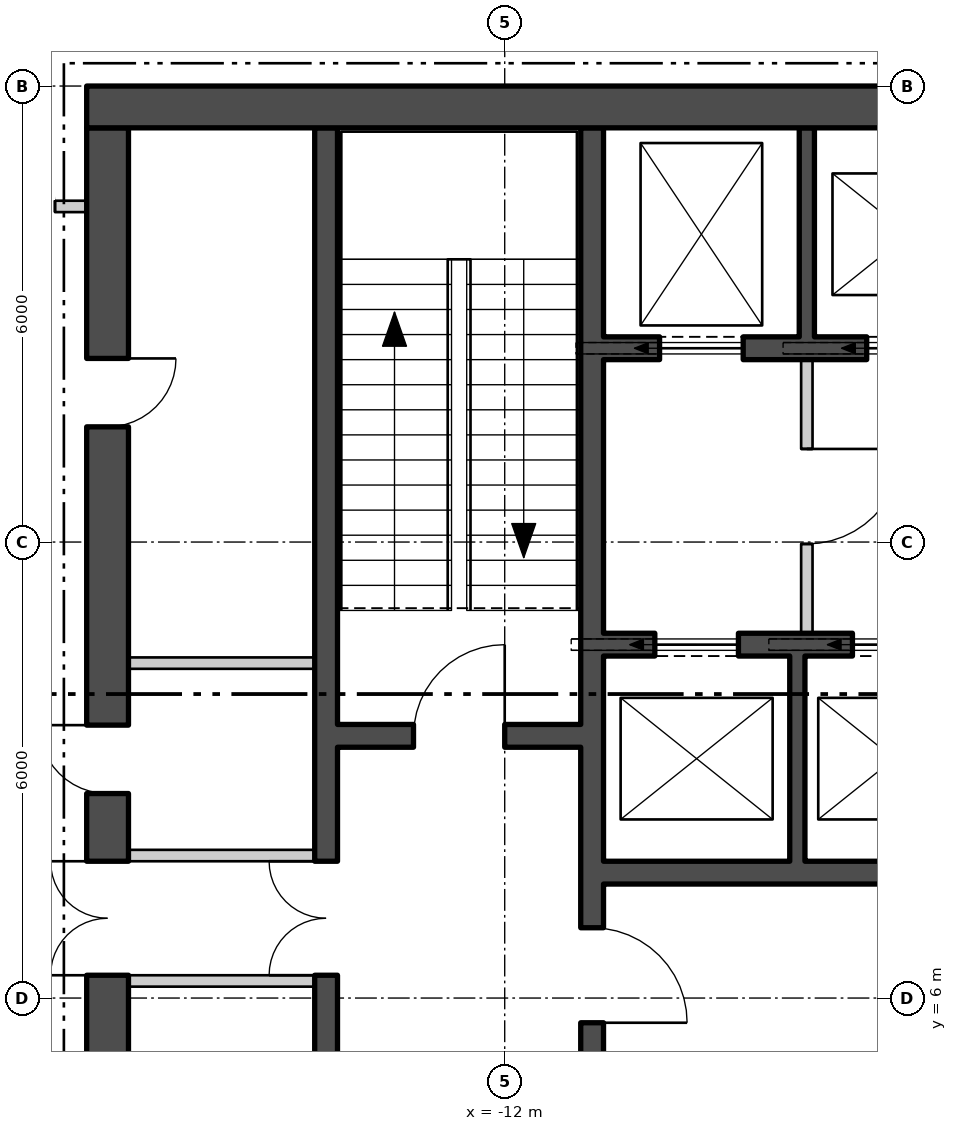
"""IFC4 building model, lengths in metres.
Left out: names, types, materials, properties, quantities, classifications, styles, units other than length and angle.
Written with IfcOpenShell. Run it as: python <this file> out.ifc"""

import sys

from ifc_helpers import new_model, si_unit, direction, frame, frame_2d, origin, place, context, subcontext, project, spatial, polyline, rectangle, outline, extrude, element, fill, save


model = new_model("IFC4")
c1 = context("Model", 3, precision=1e-05, world=origin(), true_north=direction((0.0, 1.0)))
c2 = subcontext(c1, "Body", "Model", "MODEL_VIEW")
j1 = project(units=[si_unit("LENGTHUNIT", "METRE"), si_unit("PLANEANGLEUNIT", "RADIAN")], contexts=[c1])
p1 = place(None, origin())
s1 = spatial("IfcSite", under=j1, at=p1, CompositionType="ELEMENT")
p2 = place(p1, origin())
s2 = spatial("IfcBuilding", under=s1, at=p2, CompositionType="ELEMENT")
p3 = place(p2, frame((0.0, 0.0, 84.3)))
s3 = spatial("IfcBuildingStorey", under=s2, at=p3, CompositionType="ELEMENT", Elevation=84.3)
p4 = place(p3, frame((-27.95, 11.167, -0.18), z_axis=(0.0, 0.0, 1.0), x_axis=(0.499999194392, -0.866025868902, 0.0)))
e1 = element("IfcWall", 1, at=p4, inside=s3, PredefinedType="SOLIDWALL", context=c2, shape_type="SweptSolid", body=[
    extrude(outline(polyline([(-0.13, -0.225), (45.86, -0.225), (45.6, 0.225), (0.13, 0.225), (-0.13, -0.225)])), origin(), (0.0, 0.0, 1.0), 4.28),
])
p5 = place(p4, frame((5.892, 0.0, 1.08)))
e2 = element("IfcOpeningElement", 2, at=p5, cuts=e1, PredefinedType="OPENING", context=c2, shape_type="SweptSolid", body=[
    extrude(rectangle(XDim=2.4, YDim=2.6, at=frame_2d((1.2, 1.3))), frame((0.0, 0.235, 0.0), z_axis=(0.0, -1.0, 0.0), x_axis=(1.0, 0.0, 0.0)), (0.0, 0.0, 1.0), 0.47),
])
p6 = place(p4, frame((10.399, 0.0, 1.08)))
e3 = element("IfcOpeningElement", 3, at=p6, cuts=e1, PredefinedType="OPENING", context=c2, shape_type="SweptSolid", body=[
    extrude(rectangle(XDim=2.4, YDim=2.6, at=frame_2d((1.2, 1.3))), frame((0.0, 0.235, 0.0), z_axis=(0.0, -1.0, 0.0), x_axis=(1.0, 0.0, 0.0)), (0.0, 0.0, 1.0), 0.47),
])
p7 = place(p4, frame((14.905, 0.0, 1.08)))
e4 = element("IfcOpeningElement", 4, at=p7, cuts=e1, PredefinedType="OPENING", context=c2, shape_type="SweptSolid", body=[
    extrude(rectangle(XDim=2.4, YDim=2.6, at=frame_2d((1.2, 1.3))), frame((0.0, 0.235, 0.0), z_axis=(0.0, -1.0, 0.0), x_axis=(1.0, 0.0, 0.0)), (0.0, 0.0, 1.0), 0.47),
])
p8 = place(p4, frame((19.412, 0.0, 1.08)))
e5 = element("IfcOpeningElement", 5, at=p8, cuts=e1, PredefinedType="OPENING", context=c2, shape_type="SweptSolid", body=[
    extrude(rectangle(XDim=2.4, YDim=2.6, at=frame_2d((1.2, 1.3))), frame((0.0, 0.235, 0.0), z_axis=(0.0, -1.0, 0.0), x_axis=(1.0, 0.0, 0.0)), (0.0, 0.0, 1.0), 0.47),
])
p9 = place(p4, frame((23.918, 0.0, 1.08)))
e6 = element("IfcOpeningElement", 6, at=p9, cuts=e1, PredefinedType="OPENING", context=c2, shape_type="SweptSolid", body=[
    extrude(rectangle(XDim=2.4, YDim=2.6, at=frame_2d((1.2, 1.3))), frame((0.0, 0.235, 0.0), z_axis=(0.0, -1.0, 0.0), x_axis=(1.0, 0.0, 0.0)), (0.0, 0.0, 1.0), 0.47),
])
p10 = place(p4, frame((28.425, 0.0, 1.08)))
e7 = element("IfcOpeningElement", 7, at=p10, cuts=e1, PredefinedType="OPENING", context=c2, shape_type="SweptSolid", body=[
    extrude(rectangle(XDim=2.4, YDim=2.6, at=frame_2d((1.2, 1.3))), frame((0.0, 0.235, 0.0), z_axis=(0.0, -1.0, 0.0), x_axis=(1.0, 0.0, 0.0)), (0.0, 0.0, 1.0), 0.47),
])
p11 = place(p4, frame((32.932, 0.0, 1.08)))
e8 = element("IfcOpeningElement", 8, at=p11, cuts=e1, PredefinedType="OPENING", context=c2, shape_type="SweptSolid", body=[
    extrude(rectangle(XDim=2.4, YDim=2.6, at=frame_2d((1.2, 1.3))), frame((0.0, 0.235, 0.0), z_axis=(0.0, -1.0, 0.0), x_axis=(1.0, 0.0, 0.0)), (0.0, 0.0, 1.0), 0.47),
])
p12 = place(p4, frame((37.438, 0.0, 1.08)))
e9 = element("IfcOpeningElement", 9, at=p12, cuts=e1, PredefinedType="OPENING", context=c2, shape_type="SweptSolid", body=[
    extrude(rectangle(XDim=2.4, YDim=2.6, at=frame_2d((1.2, 1.3))), frame((0.0, 0.235, 0.0), z_axis=(0.0, -1.0, 0.0), x_axis=(1.0, 0.0, 0.0)), (0.0, 0.0, 1.0), 0.47),
])
p13 = place(p4, frame((41.907, 0.0, 1.08)))
e10 = element("IfcOpeningElement", 10, at=p13, cuts=e1, PredefinedType="OPENING", context=c2, shape_type="SweptSolid", body=[
    extrude(rectangle(XDim=2.4, YDim=2.6, at=frame_2d((1.2, 1.3))), frame((0.0, 0.235, 0.0), z_axis=(0.0, -1.0, 0.0), x_axis=(1.0, 0.0, 0.0)), (0.0, 0.0, 1.0), 0.47),
])
p14 = place(p3, frame((-17.5, 17.725, 0.0), z_axis=(0.0, 0.0, 1.0), x_axis=(1.0, 0.0, 0.0)))
e11 = element("IfcWall", 11, at=p14, inside=s3, PredefinedType="SHEAR", context=c2, shape_type="SweptSolid", body=[
    extrude(rectangle(XDim=35.0, YDim=0.55, at=frame_2d((17.5, 0.0))), origin(), (0.0, 0.0, 1.0), 4.3),
])
p15 = place(p3, frame((-17.225, 0.55, 0.0), z_axis=(0.0, 0.0, 1.0), x_axis=(0.0, 1.0, 0.0)))
e12 = element("IfcWall", 12, at=p15, inside=s3, PredefinedType="SHEAR", context=c2, shape_type="SweptSolid", body=[
    extrude(rectangle(XDim=16.9, YDim=0.55, at=frame_2d((8.45, 0.0))), origin(), (0.0, 0.0, 1.0), 4.3),
])
p16 = place(p15, frame((5.75, 0.0, 0.0)))
e13 = element("IfcOpeningElement", 13, at=p16, cuts=e12, PredefinedType="OPENING", context=c2, shape_type="SweptSolid", body=[
    extrude(rectangle(XDim=1.5, YDim=2.1, at=frame_2d((0.75, 1.05))), frame((0.0, 0.285, 0.0), z_axis=(0.0, -1.0, 0.0), x_axis=(1.0, 0.0, 0.0)), (0.0, 0.0, 1.0), 0.57),
])
p17 = place(p15, frame((0.4, 0.0, 0.0)))
e14 = element("IfcOpeningElement", 14, at=p17, cuts=e12, PredefinedType="OPENING", context=c2, shape_type="SweptSolid", body=[
    extrude(rectangle(XDim=1.0, YDim=2.1, at=frame_2d((0.5, 1.05))), frame((0.0, 0.285, 0.0), z_axis=(0.0, -1.0, 0.0), x_axis=(1.0, 0.0, 0.0)), (0.0, 0.0, 1.0), 0.57),
])
p18 = place(p15, frame((3.21, 0.0, 0.0)))
e15 = element("IfcOpeningElement", 15, at=p18, cuts=e12, PredefinedType="OPENING", context=c2, shape_type="SweptSolid", body=[
    extrude(rectangle(XDim=0.9, YDim=2.1, at=frame_2d((0.45, 1.05))), frame((0.0, 0.285, 0.0), z_axis=(0.0, -1.0, 0.0), x_axis=(1.0, 0.0, 0.0)), (0.0, 0.0, 1.0), 0.57),
])
p19 = place(p15, frame((8.141, 0.0, 0.0)))
e16 = element("IfcOpeningElement", 16, at=p19, cuts=e12, PredefinedType="OPENING", context=c2, shape_type="SweptSolid", body=[
    extrude(rectangle(XDim=0.9, YDim=2.1, at=frame_2d((0.45, 1.05))), frame((0.0, 0.285, 0.0), z_axis=(0.0, -1.0, 0.0), x_axis=(1.0, 0.0, 0.0)), (0.0, 0.0, 1.0), 0.57),
])
p20 = place(p15, frame((12.966, 0.0, 0.0)))
e17 = element("IfcOpeningElement", 17, at=p20, cuts=e12, PredefinedType="OPENING", context=c2, shape_type="SweptSolid", body=[
    extrude(rectangle(XDim=0.9, YDim=2.1, at=frame_2d((0.45, 1.05))), frame((0.0, 0.285, 0.0), z_axis=(0.0, -1.0, 0.0), x_axis=(1.0, 0.0, 0.0)), (0.0, 0.0, 1.0), 0.57),
])
p21 = place(p3, frame((-10.85, 0.55, 0.0), z_axis=(0.0, 0.0, 1.0), x_axis=(0.0, 1.0, 0.0)))
e18 = element("IfcWall", 18, at=p21, inside=s3, PredefinedType="SHEAR", context=c2, shape_type="SweptSolid", body=[
    extrude(rectangle(XDim=16.9, YDim=0.3, at=frame_2d((8.45, 0.0))), origin(), (0.0, 0.0, 1.0), 4.3),
])
p22 = place(p21, frame((5.125, 0.0, 0.0)))
e19 = element("IfcOpeningElement", 19, at=p22, cuts=e18, PredefinedType="OPENING", context=c2, shape_type="SweptSolid", body=[
    extrude(rectangle(XDim=1.25, YDim=2.1, at=frame_2d((0.625, 1.05))), frame((0.0, 0.16, 0.0), z_axis=(0.0, -1.0, 0.0), x_axis=(1.0, 0.0, 0.0)), (0.0, 0.0, 1.0), 0.32),
])
p23 = place(p21, frame((1.55, 0.0, 0.0)))
e20 = element("IfcOpeningElement", 20, at=p23, cuts=e18, PredefinedType="OPENING", context=c2, shape_type="SweptSolid", body=[
    extrude(rectangle(XDim=1.0, YDim=2.1, at=frame_2d((0.5, 1.05))), frame((0.0, 0.16, 0.0), z_axis=(0.0, -1.0, 0.0), x_axis=(1.0, 0.0, 0.0)), (0.0, 0.0, 1.0), 0.32),
])
p24 = place(p3, frame((-14.35, 0.55, 0.0), z_axis=(0.0, 0.0, 1.0), x_axis=(0.0, 1.0, 0.0)))
e21 = element("IfcWall", 21, at=p24, inside=s3, PredefinedType="SHEAR", context=c2, shape_type="SweptSolid", body=[
    extrude(rectangle(XDim=16.9, YDim=0.3, at=frame_2d((8.45, 0.0))), origin(), (0.0, 0.0, 1.0), 4.3),
])
p25 = place(p24, frame((5.75, 0.0, 0.0)))
e22 = element("IfcOpeningElement", 22, at=p25, cuts=e21, PredefinedType="OPENING", context=c2, shape_type="SweptSolid", body=[
    extrude(rectangle(XDim=1.5, YDim=2.1, at=frame_2d((0.75, 1.05))), frame((0.0, 0.16, 0.0), z_axis=(0.0, -1.0, 0.0), x_axis=(1.0, 0.0, 0.0)), (0.0, 0.0, 1.0), 0.32),
])
p26 = place(p3, frame((-14.2, 9.45, 0.0), z_axis=(0.0, 0.0, 1.0), x_axis=(1.0, 0.0, 0.0)))
e23 = element("IfcWall", 23, at=p26, inside=s3, PredefinedType="SHEAR", context=c2, shape_type="SweptSolid", body=[
    extrude(rectangle(XDim=3.2, YDim=0.3, at=frame_2d((1.6, 0.0))), origin(), (0.0, 0.0, 1.0), 4.3),
])
p27 = place(p26, frame((1.0, 0.0, 0.0)))
e24 = element("IfcOpeningElement", 24, at=p27, cuts=e23, PredefinedType="OPENING", context=c2, shape_type="SweptSolid", body=[
    extrude(rectangle(XDim=1.2, YDim=2.1, at=frame_2d((0.6, 1.05))), frame((0.0, 0.16, 0.0), z_axis=(0.0, -1.0, 0.0), x_axis=(1.0, 0.0, 0.0)), (0.0, 0.0, 1.0), 0.32),
])
p28 = place(p3, frame((-10.7, 14.55, 0.0), z_axis=(0.0, 0.0, 1.0), x_axis=(1.0, 0.0, 0.0)))
e25 = element("IfcWall", 25, at=p28, inside=s3, PredefinedType="SHEAR", context=c2, shape_type="SweptSolid", body=[
    extrude(rectangle(XDim=21.4, YDim=0.3, at=frame_2d((10.7, 0.0))), origin(), (0.0, 0.0, 1.0), 4.3),
])
p29 = place(p28, frame((0.738, 0.0, 0.0)))
e26 = element("IfcOpeningElement", 26, at=p29, cuts=e25, PredefinedType="OPENING", context=c2, shape_type="SweptSolid", body=[
    extrude(rectangle(XDim=1.1, YDim=2.1, at=frame_2d((0.55, 1.05))), frame((0.0, 0.16, 0.0), z_axis=(0.0, -1.0, 0.0), x_axis=(1.0, 0.0, 0.0)), (0.0, 0.0, 1.0), 0.32),
])
p30 = place(p28, frame((3.462, 0.0, 0.0)))
e27 = element("IfcOpeningElement", 27, at=p30, cuts=e25, PredefinedType="OPENING", context=c2, shape_type="SweptSolid", body=[
    extrude(rectangle(XDim=1.1, YDim=2.1, at=frame_2d((0.55, 1.05))), frame((0.0, 0.16, 0.0), z_axis=(0.0, -1.0, 0.0), x_axis=(1.0, 0.0, 0.0)), (0.0, 0.0, 1.0), 0.32),
])
p31 = place(p28, frame((6.138, 0.0, 0.0)))
e28 = element("IfcOpeningElement", 28, at=p31, cuts=e25, PredefinedType="OPENING", context=c2, shape_type="SweptSolid", body=[
    extrude(rectangle(XDim=1.1, YDim=2.1, at=frame_2d((0.55, 1.05))), frame((0.0, 0.16, 0.0), z_axis=(0.0, -1.0, 0.0), x_axis=(1.0, 0.0, 0.0)), (0.0, 0.0, 1.0), 0.32),
])
p32 = place(p28, frame((8.812, 0.0, 0.0)))
e29 = element("IfcOpeningElement", 29, at=p32, cuts=e25, PredefinedType="OPENING", context=c2, shape_type="SweptSolid", body=[
    extrude(rectangle(XDim=1.1, YDim=2.1, at=frame_2d((0.55, 1.05))), frame((0.0, 0.16, 0.0), z_axis=(0.0, -1.0, 0.0), x_axis=(1.0, 0.0, 0.0)), (0.0, 0.0, 1.0), 0.32),
])
p33 = place(p28, frame((14.162, 0.0, 0.0)))
e30 = element("IfcOpeningElement", 30, at=p33, cuts=e25, PredefinedType="OPENING", context=c2, shape_type="SweptSolid", body=[
    extrude(rectangle(XDim=1.1, YDim=2.1, at=frame_2d((0.55, 1.05))), frame((0.0, 0.16, 0.0), z_axis=(0.0, -1.0, 0.0), x_axis=(1.0, 0.0, 0.0)), (0.0, 0.0, 1.0), 0.32),
])
p34 = place(p28, frame((16.837, 0.0, 0.0)))
e31 = element("IfcOpeningElement", 31, at=p34, cuts=e25, PredefinedType="OPENING", context=c2, shape_type="SweptSolid", body=[
    extrude(rectangle(XDim=1.1, YDim=2.1, at=frame_2d((0.55, 1.05))), frame((0.0, 0.16, 0.0), z_axis=(0.0, -1.0, 0.0), x_axis=(1.0, 0.0, 0.0)), (0.0, 0.0, 1.0), 0.32),
])
p35 = place(p28, frame((19.562, 0.0, 0.0)))
e32 = element("IfcOpeningElement", 32, at=p35, cuts=e25, PredefinedType="OPENING", context=c2, shape_type="SweptSolid", body=[
    extrude(rectangle(XDim=1.1, YDim=2.1, at=frame_2d((0.55, 1.05))), frame((0.0, 0.16, 0.0), z_axis=(0.0, -1.0, 0.0), x_axis=(1.0, 0.0, 0.0)), (0.0, 0.0, 1.0), 0.32),
])
p36 = place(p3, frame((-10.7, 10.65, 0.0), z_axis=(0.0, 0.0, 1.0), x_axis=(1.0, 0.0, 0.0)))
e33 = element("IfcWall", 33, at=p36, inside=s3, PredefinedType="SHEAR", context=c2, shape_type="SweptSolid", body=[
    extrude(rectangle(XDim=10.3, YDim=0.3, at=frame_2d((5.15, 0.0))), origin(), (0.0, 0.0, 1.0), 4.3),
])
p37 = place(p36, frame((0.675, 0.0, 0.0)))
e34 = element("IfcOpeningElement", 34, at=p37, cuts=e33, PredefinedType="OPENING", context=c2, shape_type="SweptSolid", body=[
    extrude(rectangle(XDim=1.1, YDim=2.1, at=frame_2d((0.55, 1.05))), frame((0.0, 0.16, 0.0), z_axis=(0.0, -1.0, 0.0), x_axis=(1.0, 0.0, 0.0)), (0.0, 0.0, 1.0), 0.32),
])
p38 = place(p36, frame((3.275, 0.0, 0.0)))
e35 = element("IfcOpeningElement", 35, at=p38, cuts=e33, PredefinedType="OPENING", context=c2, shape_type="SweptSolid", body=[
    extrude(rectangle(XDim=1.1, YDim=2.1, at=frame_2d((0.55, 1.05))), frame((0.0, 0.16, 0.0), z_axis=(0.0, -1.0, 0.0), x_axis=(1.0, 0.0, 0.0)), (0.0, 0.0, 1.0), 0.32),
])
p39 = place(p36, frame((5.825, 0.0, 0.0)))
e36 = element("IfcOpeningElement", 36, at=p39, cuts=e33, PredefinedType="OPENING", context=c2, shape_type="SweptSolid", body=[
    extrude(rectangle(XDim=1.1, YDim=2.1, at=frame_2d((0.55, 1.05))), frame((0.0, 0.16, 0.0), z_axis=(0.0, -1.0, 0.0), x_axis=(1.0, 0.0, 0.0)), (0.0, 0.0, 1.0), 0.32),
])
p40 = place(p36, frame((8.375, 0.0, 0.0)))
e37 = element("IfcOpeningElement", 37, at=p40, cuts=e33, PredefinedType="OPENING", context=c2, shape_type="SweptSolid", body=[
    extrude(rectangle(XDim=1.1, YDim=2.1, at=frame_2d((0.55, 1.05))), frame((0.0, 0.16, 0.0), z_axis=(0.0, -1.0, 0.0), x_axis=(1.0, 0.0, 0.0)), (0.0, 0.0, 1.0), 0.32),
])
p41 = place(p3, frame((-10.7, 7.65, 0.0), z_axis=(0.0, 0.0, 1.0), x_axis=(1.0, 0.0, 0.0)))
e38 = element("IfcWall", 38, at=p41, inside=s3, PredefinedType="SHEAR", context=c2, shape_type="SweptSolid", body=[
    extrude(rectangle(XDim=10.3, YDim=0.3, at=frame_2d((5.15, 0.0))), origin(), (0.0, 0.0, 1.0), 4.3),
])
p42 = place(p3, frame((-8.025, 14.7, 0.0), z_axis=(0.0, 0.0, 1.0), x_axis=(0.0, 1.0, 0.0)))
e39 = element("IfcWall", 39, at=p42, inside=s3, PredefinedType="SHEAR", context=c2, shape_type="SweptSolid", body=[
    extrude(rectangle(XDim=2.75, YDim=0.2, at=frame_2d((1.375, 0.0))), origin(), (0.0, 0.0, 1.0), 4.3),
])
p43 = place(p3, frame((-8.15, 7.8, 0.0), z_axis=(0.0, 0.0, 1.0), x_axis=(0.0, 1.0, 0.0)))
e40 = element("IfcWall", 40, at=p43, inside=s3, PredefinedType="SHEAR", context=c2, shape_type="SweptSolid", body=[
    extrude(rectangle(XDim=2.7, YDim=0.2, at=frame_2d((1.35, 0.0))), origin(), (0.0, 0.0, 1.0), 4.3),
])
p44 = place(p3, frame((-8.025, 10.8, 0.0), z_axis=(0.0, 0.0, 1.0), x_axis=(0.0, 1.0, 0.0)))
e41 = element("IfcWall", 41, at=p44, inside=s3, PredefinedType="PARTITIONING", context=c2, shape_type="SweptSolid", body=[
    extrude(rectangle(XDim=3.6, YDim=0.15, at=frame_2d((1.8, 0.0))), origin(), (0.0, 0.0, 1.0), 4.3),
])
p45 = place(p44, frame((1.175, 0.0, 0.0)))
e42 = element("IfcOpeningElement", 42, at=p45, cuts=e41, PredefinedType="OPENING", context=c2, shape_type="SweptSolid", body=[
    extrude(rectangle(XDim=1.25, YDim=2.1, at=frame_2d((0.625, 1.05))), frame((0.0, 0.085, 0.0), z_axis=(0.0, -1.0, 0.0), x_axis=(1.0, 0.0, 0.0)), (0.0, 0.0, 1.0), 0.17),
])
for number, where, z_axis, x_axis in (
    (43, (-16.95, 6.225, 0.0), (0.0, 0.0, 1.0), (1.0, 0.0, 0.0)),
    (44, (-16.95, 7.875, 0.0), (0.0, 0.0, 1.0), (1.0, 0.0, 0.0)),
    (45, (-16.95, 10.407, 0.0), (0.0, 0.0, 1.0), (1.0, 0.0, 0.0)),
):
    element("IfcWall", number, at=place(p3, frame(where, z_axis=z_axis, x_axis=x_axis)), inside=s3, PredefinedType="PARTITIONING", context=c2, shape_type="SweptSolid", body=[
        extrude(rectangle(XDim=2.45, YDim=0.15, at=frame_2d((1.225, 0.0))), origin(), (0.0, 0.0, 1.0), 4.3),
    ])
p46 = place(p3, frame((-19.225, 16.416, 0.0), z_axis=(0.0, 0.0, 1.0), x_axis=(1.0, 0.0, 0.0)))
e46 = element("IfcWall", 46, at=p46, inside=s3, PredefinedType="PARTITIONING", context=c2, shape_type="SweptSolid", body=[
    extrude(rectangle(XDim=1.725, YDim=0.15, at=frame_2d((0.863, 0.0))), origin(), (0.0, 0.0, 1.0), 4.3),
])
p47 = place(p46, frame((0.308, 0.0, 0.0)))
e47 = element("IfcOpeningElement", 47, at=p47, cuts=e46, PredefinedType="OPENING", context=c2, shape_type="SweptSolid", body=[
    extrude(rectangle(XDim=1.0, YDim=2.1, at=frame_2d((0.5, 1.05))), frame((0.0, 0.085, 0.0), z_axis=(0.0, -1.0, 0.0), x_axis=(1.0, 0.0, 0.0)), (0.0, 0.0, 1.0), 0.17),
])
p48 = place(p29, origin())
e48 = element("IfcDoor", 48, at=p48, inside=s3, OperationType="SLIDING_TO_LEFT", PredefinedType="DOOR", context=c2, shape_type="SweptSolid", body=[
    extrude(rectangle(XDim=1.1, YDim=2.1, at=frame_2d((0.55, 1.05))), frame((0.0, 0.025, 0.0), z_axis=(0.0, -1.0, 0.0), x_axis=(1.0, 0.0, 0.0)), (0.0, 0.0, 1.0), 0.05),
])
fill(e26, e48)
p49 = place(p30, origin())
e49 = element("IfcDoor", 49, at=p49, inside=s3, OperationType="SLIDING_TO_LEFT", PredefinedType="DOOR", context=c2, shape_type="SweptSolid", body=[
    extrude(rectangle(XDim=1.1, YDim=2.1, at=frame_2d((0.55, 1.05))), frame((0.0, 0.025, 0.0), z_axis=(0.0, -1.0, 0.0), x_axis=(1.0, 0.0, 0.0)), (0.0, 0.0, 1.0), 0.05),
])
fill(e27, e49)
p50 = place(p37, origin())
e50 = element("IfcDoor", 50, at=p50, inside=s3, OperationType="SLIDING_TO_LEFT", PredefinedType="DOOR", context=c2, shape_type="SweptSolid", body=[
    extrude(rectangle(XDim=1.1, YDim=2.1, at=frame_2d((0.55, 1.05))), frame((0.0, 0.025, 0.0), z_axis=(0.0, -1.0, 0.0), x_axis=(1.0, 0.0, 0.0)), (0.0, 0.0, 1.0), 0.05),
])
fill(e34, e50)
p51 = place(p38, origin())
e51 = element("IfcDoor", 51, at=p51, inside=s3, OperationType="SLIDING_TO_LEFT", PredefinedType="DOOR", context=c2, shape_type="SweptSolid", body=[
    extrude(rectangle(XDim=1.1, YDim=2.1, at=frame_2d((0.55, 1.05))), frame((0.0, 0.025, 0.0), z_axis=(0.0, -1.0, 0.0), x_axis=(1.0, 0.0, 0.0)), (0.0, 0.0, 1.0), 0.05),
])
fill(e35, e51)
p52 = place(p45, origin())
e52 = element("IfcDoor", 52, at=p52, inside=s3, OperationType="SINGLE_SWING_RIGHT", PredefinedType="DOOR", context=c2, shape_type="SweptSolid", body=[
    extrude(rectangle(XDim=1.25, YDim=2.1, at=frame_2d((0.625, 1.05))), frame((0.0, 0.025, 0.0), z_axis=(0.0, -1.0, 0.0), x_axis=(1.0, 0.0, 0.0)), (0.0, 0.0, 1.0), 0.05),
])
fill(e42, e52)
p53 = place(p27, origin())
e53 = element("IfcDoor", 53, at=p53, inside=s3, OperationType="SINGLE_SWING_LEFT", PredefinedType="DOOR", context=c2, shape_type="SweptSolid", body=[
    extrude(rectangle(XDim=1.2, YDim=2.1, at=frame_2d((0.6, 1.05))), frame((0.0, 0.025, 0.0), z_axis=(0.0, -1.0, 0.0), x_axis=(1.0, 0.0, 0.0)), (0.0, 0.0, 1.0), 0.05),
])
fill(e24, e53)
p54 = place(p22, origin())
e54 = element("IfcDoor", 54, at=p54, inside=s3, OperationType="SINGLE_SWING_LEFT", PredefinedType="DOOR", context=c2, shape_type="SweptSolid", body=[
    extrude(rectangle(XDim=1.25, YDim=2.1, at=frame_2d((0.625, 1.05))), frame((0.0, 0.025, 0.0), z_axis=(0.0, -1.0, 0.0), x_axis=(1.0, 0.0, 0.0)), (0.0, 0.0, 1.0), 0.05),
])
fill(e19, e54)
p55 = place(p25, origin())
e55 = element("IfcDoor", 55, at=p55, inside=s3, OperationType="DOUBLE_DOOR_SINGLE_SWING", PredefinedType="DOOR", context=c2, shape_type="SweptSolid", body=[
    extrude(rectangle(XDim=1.5, YDim=2.1, at=frame_2d((0.75, 1.05))), frame((0.0, 0.025, 0.0), z_axis=(0.0, -1.0, 0.0), x_axis=(1.0, 0.0, 0.0)), (0.0, 0.0, 1.0), 0.05),
])
fill(e22, e55)
p56 = place(p16, origin())
e56 = element("IfcDoor", 56, at=p56, inside=s3, OperationType="DOUBLE_DOOR_SINGLE_SWING", PredefinedType="DOOR", context=c2, shape_type="SweptSolid", body=[
    extrude(rectangle(XDim=1.5, YDim=2.1, at=frame_2d((0.75, 1.05))), frame((0.0, 0.025, 0.0), z_axis=(0.0, -1.0, 0.0), x_axis=(1.0, 0.0, 0.0)), (0.0, 0.0, 1.0), 0.05),
])
fill(e13, e56)
p57 = place(p19, origin())
e57 = element("IfcDoor", 57, at=p57, inside=s3, OperationType="SINGLE_SWING_LEFT", PredefinedType="DOOR", context=c2, shape_type="SweptSolid", body=[
    extrude(rectangle(XDim=0.9, YDim=2.1, at=frame_2d((0.45, 1.05))), frame((0.0, 0.025, 0.0), z_axis=(0.0, -1.0, 0.0), x_axis=(1.0, 0.0, 0.0)), (0.0, 0.0, 1.0), 0.05),
])
fill(e16, e57)
p58 = place(p20, origin())
e58 = element("IfcDoor", 58, at=p58, inside=s3, OperationType="SINGLE_SWING_RIGHT", PredefinedType="DOOR", context=c2, shape_type="SweptSolid", body=[
    extrude(rectangle(XDim=0.9, YDim=2.1, at=frame_2d((0.45, 1.05))), frame((0.0, 0.025, 0.0), z_axis=(0.0, -1.0, 0.0), x_axis=(1.0, 0.0, 0.0)), (0.0, 0.0, 1.0), 0.05),
])
fill(e17, e58)
p59 = place(p47, origin())
e59 = element("IfcDoor", 59, at=p59, inside=s3, OperationType="SINGLE_SWING_RIGHT", PredefinedType="DOOR", context=c2, shape_type="SweptSolid", body=[
    extrude(rectangle(XDim=1.0, YDim=2.1, at=frame_2d((0.5, 1.05))), frame((0.0, 0.025, 0.0), z_axis=(0.0, -1.0, 0.0), x_axis=(1.0, 0.0, 0.0)), (0.0, 0.0, 1.0), 0.05),
])
fill(e47, e59)
save(model, sys.argv[1])
